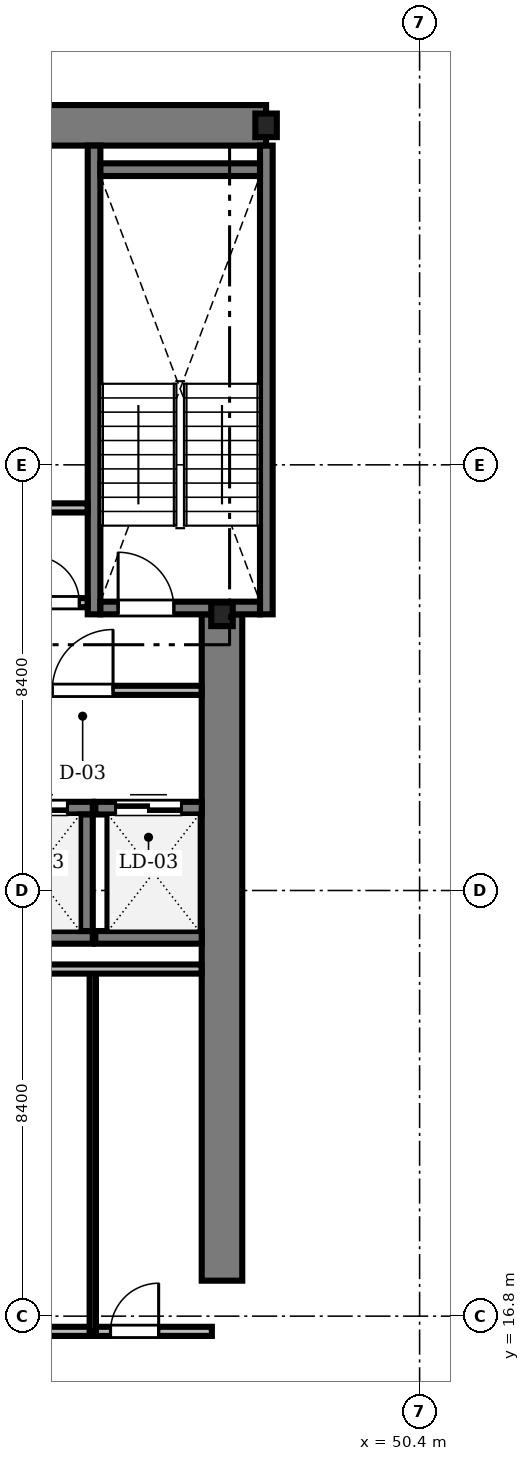
"""IFC4 building model, lengths in metres.
Left out: names, types, materials, properties, quantities, classifications, styles, units other than length and angle.
Written with IfcOpenShell. Run it as: python <this file> out.ifc"""

import sys

from ifc_helpers import new_model, si_unit, direction, frame, frame_2d, origin, origin_2d, place, context, subcontext, project, spatial, rectangle, i_section, extrude, source, transform, mapped, element, fill, save


model = new_model("IFC4")
c1 = context("Model", 3, precision=1e-05, world=origin(), true_north=direction((0.0, 1.0)))
c2 = subcontext(c1, "Body", "Model", "MODEL_VIEW")
j1 = project(units=[si_unit("LENGTHUNIT", "METRE"), si_unit("PLANEANGLEUNIT", "RADIAN")], contexts=[c1])
p1 = place(None, origin())
s1 = spatial("IfcSite", under=j1, at=p1, CompositionType="ELEMENT")
p2 = place(p1, origin())
s2 = spatial("IfcBuilding", under=s1, at=p2, CompositionType="ELEMENT")
p3 = place(p2, frame((0.0, 0.0, 159.4)))
s3 = spatial("IfcBuildingStorey", under=s2, at=p3, CompositionType="ELEMENT", Elevation=159.4)
m1 = source(origin(), c2, "Body", "SweptSolid", [
    extrude(rectangle(XDim=17.52, YDim=0.8, at=frame_2d((8.76, 0.0))), origin(), (0.0, 0.0, 1.0), 3.46),
])
p4 = place(p3, frame((29.85, 40.3, 0.0), z_axis=(0.0, 0.0, 1.0), x_axis=(1.0, 0.0, 0.0)))
e1 = element("IfcWall", 1, at=p4, inside=s3, PredefinedType="SHEAR", context=c2, shape_type="MappedRepresentation", body=[
    mapped(m1, transform((0.0, 0.0, 0.0), scale=1.0)),
])
m2 = source(origin(), c2, "Body", "SweptSolid", [
    extrude(rectangle(XDim=13.15, YDim=0.8, at=frame_2d((6.575, 0.0))), origin(), (0.0, 0.0, 1.0), 3.46),
])
p5 = place(p3, frame((46.5, 17.5, 0.0), z_axis=(0.0, 0.0, 1.0), x_axis=(0.0, 1.0, 0.0)))
e2 = element("IfcWall", 2, at=p5, inside=s3, PredefinedType="SHEAR", context=c2, shape_type="MappedRepresentation", body=[
    mapped(m2, transform((0.0, 0.0, 0.0), scale=1.0)),
])
m3 = source(origin(), c2, "Body", "SweptSolid", [
    extrude(i_section(OverallWidth=0.424, OverallDepth=0.465, WebThickness=0.035, FlangeThickness=0.056, FilletRadius=0.015, at=origin_2d()), origin(), (0.0, 0.0, 1.0), 3.46),
])
for number, where, z_axis, x_axis in (
    (3, (46.5, 30.65, 0.0), (0.0, 0.0, 1.0), (1.0, 0.0, 0.0)),
    (4, (47.37, 40.3, 0.0), (0.0, 0.0, 1.0), (1.0, 0.0, 0.0)),
):
    element("IfcColumn", number, at=place(p3, frame(where, z_axis=z_axis, x_axis=x_axis)), inside=s3, PredefinedType="COLUMN", context=c2, shape_type="MappedRepresentation", body=[
        mapped(m3, transform((0.0, 0.0, 0.0), scale=1.0)),
    ])
m4 = source(origin(), c2, "Body", "SweptSolid", [
    extrude(rectangle(XDim=9.25, YDim=0.25, at=frame_2d((4.625, 0.0))), origin(), (0.0, 0.0, 1.0), 3.5),
])
for number, where, z_axis, x_axis in (
    (5, (43.975, 30.65, 0.0), (0.0, 0.0, 1.0), (0.0, 1.0, 0.0)),
    (6, (47.375, 30.65, 0.0), (0.0, 0.0, 1.0), (0.0, 1.0, 0.0)),
):
    element("IfcWall", number, at=place(p3, frame(where, z_axis=z_axis, x_axis=x_axis)), inside=s3, PredefinedType="SOLIDWALL", context=c2, shape_type="MappedRepresentation", body=[
        mapped(m4, transform((0.0, 0.0, 0.0), scale=1.0)),
    ])
m5 = source(origin(), c2, "Body", "SweptSolid", [
    extrude(rectangle(XDim=3.15, YDim=0.25, at=frame_2d((1.575, 0.0))), origin(), (0.0, 0.0, 1.0), 3.5),
])
p6 = place(p3, frame((44.1, 39.425, 0.0), z_axis=(0.0, 0.0, 1.0), x_axis=(1.0, 0.0, 0.0)))
e7 = element("IfcWall", 7, at=p6, inside=s3, PredefinedType="SOLIDWALL", context=c2, shape_type="MappedRepresentation", body=[
    mapped(m5, transform((0.0, 0.0, 0.0), scale=1.0)),
])
p7 = place(p3, frame((44.1, 30.775, 0.0), z_axis=(0.0, 0.0, 1.0), x_axis=(1.0, 0.0, 0.0)))
e8 = element("IfcWall", 8, at=p7, inside=s3, PredefinedType="SOLIDWALL", context=c2, shape_type="MappedRepresentation", body=[
    mapped(m5, transform((0.0, 0.0, 0.0), scale=1.0)),
])
m6 = source(origin(), c2, "Body", "SweptSolid", [
    extrude(rectangle(XDim=1.1, YDim=2.2, at=frame_2d((0.55, 1.1))), frame((0.0, 0.135, 0.0), z_axis=(0.0, -1.0, 0.0), x_axis=(1.0, 0.0, 0.0)), (0.0, 0.0, 1.0), 0.27),
])
p8 = place(p7, frame((0.35, 0.0, 0.0)))
e9 = element("IfcOpeningElement", 9, at=p8, cuts=e8, PredefinedType="OPENING", context=c2, shape_type="MappedRepresentation", body=[
    mapped(m6, transform((0.0, 0.0, 0.0), scale=1.0)),
])
m7 = source(origin(), c2, "Body", "SweptSolid", [
    extrude(rectangle(XDim=2.3, YDim=0.25, at=frame_2d((1.15, 0.0))), origin(), (0.0, 0.0, 1.0), 3.46),
])
p9 = place(p3, frame((41.65, 24.275, 0.0), z_axis=(0.0, 0.0, 1.0), x_axis=(1.0, 0.0, 0.0)))
e10 = element("IfcWall", 10, at=p9, inside=s3, PredefinedType="SOLIDWALL", context=c2, shape_type="MappedRepresentation", body=[
    mapped(m7, transform((0.0, 0.0, 0.0), scale=1.0)),
])
p10 = place(p3, frame((41.65, 26.825, 0.0), z_axis=(0.0, 0.0, 1.0), x_axis=(1.0, 0.0, 0.0)))
e11 = element("IfcWall", 11, at=p10, inside=s3, PredefinedType="SOLIDWALL", context=c2, shape_type="MappedRepresentation", body=[
    mapped(m7, transform((0.0, 0.0, 0.0), scale=1.0)),
])
m8 = source(origin(), c2, "Body", "SweptSolid", [
    extrude(rectangle(XDim=1.3, YDim=2.3, at=frame_2d((0.65, 1.15))), frame((0.0, 0.135, 0.0), z_axis=(0.0, -1.0, 0.0), x_axis=(1.0, 0.0, 0.0)), (0.0, 0.0, 1.0), 0.27),
])
p11 = place(p10, frame((0.5, 0.0, 0.0)))
e12 = element("IfcOpeningElement", 12, at=p11, cuts=e11, PredefinedType="OPENING", context=c2, shape_type="MappedRepresentation", body=[
    mapped(m8, transform((0.0, 0.0, 0.0), scale=1.0)),
])
p12 = place(p3, frame((43.825, 24.4, 0.0), z_axis=(0.0, 0.0, 1.0), x_axis=(0.0, 1.0, 0.0)))
e13 = element("IfcWall", 13, at=p12, inside=s3, PredefinedType="SOLIDWALL", context=c2, shape_type="MappedRepresentation", body=[
    mapped(m7, transform((0.0, 0.0, 0.0), scale=1.0)),
])
m9 = source(origin(), c2, "Body", "SweptSolid", [
    extrude(rectangle(XDim=2.1, YDim=0.25, at=frame_2d((1.05, 0.0))), origin(), (0.0, 0.0, 1.0), 3.46),
])
p13 = place(p3, frame((44.0, 24.275, 0.0), z_axis=(0.0, 0.0, 1.0), x_axis=(1.0, 0.0, 0.0)))
e14 = element("IfcWall", 14, at=p13, inside=s3, PredefinedType="SOLIDWALL", context=c2, shape_type="MappedRepresentation", body=[
    mapped(m9, transform((0.0, 0.0, 0.0), scale=1.0)),
])
p14 = place(p3, frame((44.0, 26.825, 0.0), z_axis=(0.0, 0.0, 1.0), x_axis=(1.0, 0.0, 0.0)))
e15 = element("IfcWall", 15, at=p14, inside=s3, PredefinedType="SOLIDWALL", context=c2, shape_type="MappedRepresentation", body=[
    mapped(m9, transform((0.0, 0.0, 0.0), scale=1.0)),
])
p15 = place(p14, frame((0.4, 0.0, 0.0)))
e16 = element("IfcOpeningElement", 16, at=p15, cuts=e15, PredefinedType="OPENING", context=c2, shape_type="MappedRepresentation", body=[
    mapped(m8, transform((0.0, 0.0, 0.0), scale=1.0)),
])
m10 = source(origin(), c2, "Body", "SweptSolid", [
    extrude(rectangle(XDim=4.548, YDim=0.18, at=frame_2d((2.274, 0.0))), origin(), (0.0, 0.0, 1.0), 3.092),
])
p16 = place(p3, frame((41.55, 29.15, 0.0), z_axis=(0.0, 0.0, 1.0), x_axis=(1.0, 0.0, 0.0)))
e17 = element("IfcWall", 17, at=p16, inside=s3, PredefinedType="PARTITIONING", context=c2, shape_type="MappedRepresentation", body=[
    mapped(m10, transform((0.0, 0.0, 0.0), scale=1.0)),
])
m11 = source(origin(), c2, "Body", "SweptSolid", [
    extrude(rectangle(XDim=1.2, YDim=2.2, at=frame_2d((0.6, 1.1))), frame((0.0, 0.1, 0.0), z_axis=(0.0, -1.0, 0.0), x_axis=(1.0, 0.0, 0.0)), (0.0, 0.0, 1.0), 0.2),
])
p17 = place(p16, frame((1.6, 0.0, 0.0)))
e18 = element("IfcOpeningElement", 18, at=p17, cuts=e17, PredefinedType="OPENING", context=c2, shape_type="MappedRepresentation", body=[
    mapped(m11, transform((0.0, 0.0, 0.0), scale=1.0)),
])
m12 = source(origin(), c2, "Body", "SweptSolid", [
    extrude(rectangle(XDim=4.7, YDim=0.18, at=frame_2d((2.35, 0.0))), origin(), (0.0, 0.0, 1.0), 2.852),
])
p18 = place(p3, frame((41.6, 16.5, 0.0), z_axis=(0.0, 0.0, 1.0), x_axis=(1.0, 0.0, 0.0)))
e19 = element("IfcWall", 19, at=p18, inside=s3, PredefinedType="PARTITIONING", context=c2, shape_type="MappedRepresentation", body=[
    mapped(m12, transform((0.0, 0.0, 0.0), scale=1.0)),
])
m13 = source(origin(), c2, "Body", "SweptSolid", [
    extrude(rectangle(XDim=0.95, YDim=2.15, at=frame_2d((0.475, 1.075))), frame((0.0, 0.1, 0.0), z_axis=(0.0, -1.0, 0.0), x_axis=(1.0, 0.0, 0.0)), (0.0, 0.0, 1.0), 0.2),
])
p19 = place(p18, frame((0.35, 0.0, 0.0)))
e20 = element("IfcOpeningElement", 20, at=p19, cuts=e19, PredefinedType="OPENING", context=c2, shape_type="MappedRepresentation", body=[
    mapped(m13, transform((0.0, 0.0, 0.0), scale=1.0)),
])
p20 = place(p18, frame((2.7, 0.0, 0.0)))
e21 = element("IfcOpeningElement", 21, at=p20, cuts=e19, PredefinedType="OPENING", context=c2, shape_type="MappedRepresentation", body=[
    mapped(m13, transform((0.0, 0.0, 0.0), scale=1.0)),
])
m14 = source(origin(), c2, "Body", "SweptSolid", [
    extrude(rectangle(XDim=1.248, YDim=0.18, at=frame_2d((0.624, 0.0))), origin(), (0.0, 0.0, 1.0), 3.46),
])
p21 = place(p3, frame((42.6, 30.88, 0.0), z_axis=(0.0, 0.0, 1.0), x_axis=(1.0, 0.0, 0.0)))
e22 = element("IfcWall", 22, at=p21, inside=s3, PredefinedType="PARTITIONING", context=c2, shape_type="MappedRepresentation", body=[
    mapped(m14, transform((0.0, 0.0, 0.0), scale=1.0)),
])
m15 = source(origin(), c2, "Body", "SweptSolid", [
    extrude(rectangle(XDim=0.92, YDim=2.1, at=frame_2d((0.46, 1.05))), frame((0.0, 0.1, 0.0), z_axis=(0.0, -1.0, 0.0), x_axis=(1.0, 0.0, 0.0)), (0.0, 0.0, 1.0), 0.2),
])
p22 = place(p21, frame((0.164, 0.0, 0.0)))
e23 = element("IfcOpeningElement", 23, at=p22, cuts=e22, PredefinedType="OPENING", context=c2, shape_type="MappedRepresentation", body=[
    mapped(m15, transform((0.0, 0.0, 0.0), scale=1.0)),
])
m16 = source(origin(), c2, "Body", "SweptSolid", [
    extrude(rectangle(XDim=7.15, YDim=0.125, at=frame_2d((3.575, 0.0))), origin(), (0.0, 0.0, 1.0), 2.852),
])
p23 = place(p3, frame((43.95, 16.5, 0.0), z_axis=(0.0, 0.0, 1.0), x_axis=(0.0, 1.0, 0.0)))
e24 = element("IfcWall", 24, at=p23, inside=s3, PredefinedType="PARTITIONING", context=c2, shape_type="MappedRepresentation", body=[
    mapped(m16, transform((0.0, 0.0, 0.0), scale=1.0)),
])
m17 = source(origin(), c2, "Body", "SweptSolid", [
    extrude(rectangle(XDim=4.498, YDim=0.18, at=frame_2d((2.249, 0.0))), origin(), (0.0, 0.0, 1.0), 3.46),
])
p24 = place(p3, frame((41.6, 23.65, 0.0), z_axis=(0.0, 0.0, 1.0), x_axis=(1.0, 0.0, 0.0)))
e25 = element("IfcWall", 25, at=p24, inside=s3, PredefinedType="PARTITIONING", context=c2, shape_type="MappedRepresentation", body=[
    mapped(m17, transform((0.0, 0.0, 0.0), scale=1.0)),
])
m18 = source(origin(), c2, "Body", "SweptSolid", [
    extrude(rectangle(XDim=1.348, YDim=0.18, at=frame_2d((0.674, 0.0))), origin(), (0.0, 0.0, 1.0), 3.46),
])
p25 = place(p3, frame((42.5, 32.75, 0.0), z_axis=(0.0, 0.0, 1.0), x_axis=(1.0, 0.0, 0.0)))
e26 = element("IfcWall", 26, at=p25, inside=s3, PredefinedType="PARTITIONING", context=c2, shape_type="MappedRepresentation", body=[
    mapped(m18, transform((0.0, 0.0, 0.0), scale=1.0)),
])
m19 = source(origin(), c2, "Body", "SweptSolid", [
    extrude(rectangle(XDim=1.1, YDim=2.2, at=frame_2d((0.55, 1.1))), frame((0.0, 0.025, 0.0), z_axis=(0.0, -1.0, 0.0), x_axis=(1.0, 0.0, 0.0)), (0.0, 0.0, 1.0), 0.05),
])
p26 = place(p8, origin())
e27 = element("IfcDoor", 27, at=p26, inside=s3, OperationType="SINGLE_SWING_LEFT", PredefinedType="DOOR", context=c2, shape_type="MappedRepresentation", body=[
    mapped(m19, transform((0.0, 0.0, 0.0), scale=1.0)),
])
fill(e9, e27)
m20 = source(origin(), c2, "Body", "SweptSolid", [
    extrude(rectangle(XDim=1.3, YDim=2.3, at=frame_2d((0.65, 1.15))), frame((0.0, 0.025, 0.0), z_axis=(0.0, -1.0, 0.0), x_axis=(1.0, 0.0, 0.0)), (0.0, 0.0, 1.0), 0.05),
])
p27 = place(p11, origin())
e28 = element("IfcDoor", 28, at=p27, inside=s3, OperationType="DOUBLE_DOOR_SLIDING", PredefinedType="DOOR", context=c2, shape_type="MappedRepresentation", body=[
    mapped(m20, transform((0.0, 0.0, 0.0), scale=1.0)),
])
fill(e12, e28)
p28 = place(p15, origin())
e29 = element("IfcDoor", 29, at=p28, inside=s3, OperationType="DOUBLE_DOOR_SLIDING", PredefinedType="DOOR", context=c2, shape_type="MappedRepresentation", body=[
    mapped(m20, transform((0.0, 0.0, 0.0), scale=1.0)),
])
fill(e16, e29)
m21 = source(origin(), c2, "Body", "SweptSolid", [
    extrude(rectangle(XDim=1.2, YDim=2.2, at=frame_2d((0.6, 1.1))), frame((0.0, 0.025, 0.0), z_axis=(0.0, -1.0, 0.0), x_axis=(1.0, 0.0, 0.0)), (0.0, 0.0, 1.0), 0.05),
])
p29 = place(p17, origin())
e30 = element("IfcDoor", 30, at=p29, inside=s3, OperationType="SINGLE_SWING_RIGHT", PredefinedType="DOOR", context=c2, shape_type="MappedRepresentation", body=[
    mapped(m21, transform((0.0, 0.0, 0.0), scale=1.0)),
])
fill(e18, e30)
m22 = source(origin(), c2, "Body", "SweptSolid", [
    extrude(rectangle(XDim=0.95, YDim=2.15, at=frame_2d((0.475, 1.075))), frame((0.0, 0.025, 0.0), z_axis=(0.0, -1.0, 0.0), x_axis=(1.0, 0.0, 0.0)), (0.0, 0.0, 1.0), 0.05),
])
p30 = place(p20, origin())
e31 = element("IfcDoor", 31, at=p30, inside=s3, OperationType="SINGLE_SWING_RIGHT", PredefinedType="DOOR", context=c2, shape_type="MappedRepresentation", body=[
    mapped(m22, transform((0.0, 0.0, 0.0), scale=1.0)),
])
fill(e21, e31)
m23 = source(origin(), c2, "Body", "SweptSolid", [
    extrude(rectangle(XDim=0.92, YDim=2.1, at=frame_2d((0.46, 1.05))), frame((0.0, 0.025, 0.0), z_axis=(0.0, -1.0, 0.0), x_axis=(1.0, 0.0, 0.0)), (0.0, 0.0, 1.0), 0.05),
])
p31 = place(p22, origin())
e32 = element("IfcDoor", 32, at=p31, inside=s3, OperationType="SINGLE_SWING_LEFT", PredefinedType="DOOR", context=c2, shape_type="MappedRepresentation", body=[
    mapped(m23, transform((0.0, 0.0, 0.0), scale=1.0)),
])
fill(e23, e32)
save(model, sys.argv[1])
